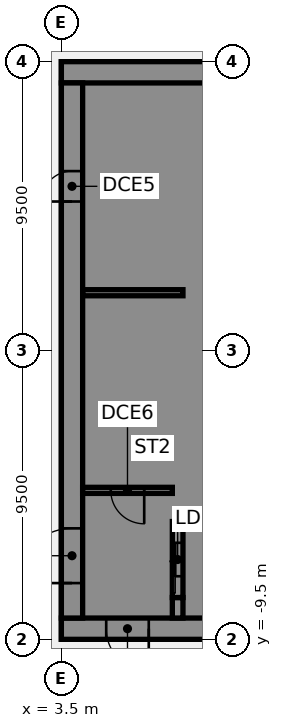
"""IFC4 building model, lengths in metres.
Left out: names, types, materials, properties, quantities, classifications, styles, units other than length and angle.
Written with IfcOpenShell. Run it as: python <this file> out.ifc"""

import sys

from ifc_helpers import new_model, si_unit, direction, frame, frame_2d, origin, place, context, subcontext, project, spatial, polyline, rectangle, outline, extrude, element, fill, save


model = new_model("IFC4")
c1 = context("Model", 3, precision=1e-05, world=origin(), true_north=direction((0.0, 1.0)))
c2 = subcontext(c1, "Body", "Model", "MODEL_VIEW")
j1 = project(units=[si_unit("LENGTHUNIT", "METRE"), si_unit("PLANEANGLEUNIT", "RADIAN")], contexts=[c1])
p1 = place(None, origin())
s1 = spatial("IfcSite", under=j1, at=p1, CompositionType="ELEMENT")
p2 = place(p1, origin())
s2 = spatial("IfcBuilding", under=s1, at=p2, CompositionType="ELEMENT")
p3 = place(p2, frame((0.0, 0.0, 37.75)))
s3 = spatial("IfcBuildingStorey", under=s2, at=p3, CompositionType="ELEMENT", Elevation=37.75)
p4 = place(p3, frame((16.5, -9.15, 0.0), z_axis=(0.0, 0.0, 1.0), x_axis=(-1.0, 0.0, 0.0)))
e1 = element("IfcWall", 1, at=p4, inside=s3, PredefinedType="SHEAR", context=c2, shape_type="SweptSolid", body=[
    extrude(rectangle(XDim=13.0, YDim=0.7, at=frame_2d((6.5, 0.0))), origin(), (0.0, 0.0, 1.0), 3.61),
])
p5 = place(p4, frame((4.15, 0.0, 0.0)))
e2 = element("IfcOpeningElement", 2, at=p5, cuts=e1, PredefinedType="OPENING", context=c2, shape_type="SweptSolid", body=[
    extrude(rectangle(XDim=1.4, YDim=2.1, at=frame_2d((0.7, 1.05))), frame((0.0, 0.36, 0.0), z_axis=(0.0, -1.0, 0.0), x_axis=(1.0, 0.0, 0.0)), (0.0, 0.0, 1.0), 0.72),
])
p6 = place(p4, frame((10.125, 0.0, 0.0)))
e3 = element("IfcOpeningElement", 3, at=p6, cuts=e1, PredefinedType="OPENING", context=c2, shape_type="SweptSolid", body=[
    extrude(rectangle(XDim=1.4, YDim=2.1, at=frame_2d((0.7, 1.05))), frame((0.0, 0.36, 0.0), z_axis=(0.0, -1.0, 0.0), x_axis=(1.0, 0.0, 0.0)), (0.0, 0.0, 1.0), 0.72),
])
p7 = place(p3, frame((16.5, 9.15, 0.0), z_axis=(0.0, 0.0, 1.0), x_axis=(-1.0, 0.0, 0.0)))
e4 = element("IfcWall", 4, at=p7, inside=s3, PredefinedType="SHEAR", context=c2, shape_type="SweptSolid", body=[
    extrude(rectangle(XDim=13.0, YDim=0.7, at=frame_2d((6.5, 0.0))), origin(), (0.0, 0.0, 1.0), 3.61),
])
p8 = place(p3, origin())
e5 = element("IfcWall", 5, at=p8, inside=s3, PredefinedType="SHEAR", context=c2, shape_type="SweptSolid", body=[
    extrude(outline(polyline([(9.8, -5.375), (7.5, -5.375), (7.5, -2.875), (9.8, -2.875), (9.8, -2.625), (7.5, -2.625), (7.5, -0.125), (9.8, -0.125), (9.8, 0.125), (7.5, 0.125), (7.5, 2.625), (9.8, 2.625), (9.8, 2.875), (7.5, 2.875), (7.5, 5.375), (9.8, 5.375), (9.8, 5.625), (7.5, 5.625), (7.5, 8.125), (9.8, 8.125), (9.8, 8.8), (7.5, 8.8), (7.15, 8.8), (7.15, -5.625), (7.5, -5.625), (9.8, -5.625), (9.8, -5.375)])), origin(), (0.0, 0.0, 1.0), 3.61),
])
p9 = place(p3, origin())
e6 = element("IfcWall", 6, at=p9, inside=s3, PredefinedType="SHEAR", context=c2, shape_type="SweptSolid", body=[
    extrude(outline(polyline([(7.5, -8.125), (7.5, -8.8), (9.8, -8.8), (9.8, -8.125), (9.8, -5.625), (9.55, -5.625), (9.55, -8.125), (7.5, -8.125)])), origin(), (0.0, 0.0, 1.0), 3.61),
])
p10 = place(p3, frame((7.325, -8.8, 0.0), z_axis=(0.0, 0.0, 1.0), x_axis=(0.0, 1.0, 0.0)))
e7 = element("IfcWall", 7, at=p10, inside=s3, PredefinedType="SHEAR", context=c2, shape_type="SweptSolid", body=[
    extrude(rectangle(XDim=0.675, YDim=0.35, at=frame_2d((0.337, 0.0))), origin(), (0.0, 0.0, 1.0), 3.61),
])
p11 = place(p3, frame((7.5, 1.9, 0.0), z_axis=(0.0, 0.0, 1.0), x_axis=(-1.0, 0.0, 0.0)))
e8 = element("IfcWall", 8, at=p11, inside=s3, PredefinedType="SHEAR", context=c2, shape_type="SweptSolid", body=[
    extrude(rectangle(XDim=3.3, YDim=0.2, at=frame_2d((1.65, 0.0))), origin(), (0.0, 0.0, 1.0), 3.61),
])
p12 = place(p3, frame((7.325, -8.125, 0.0), z_axis=(0.0, 0.0, 1.0), x_axis=(0.0, 1.0, 0.0)))
e9 = element("IfcWall", 9, at=p12, inside=s3, PredefinedType="SHEAR", context=c2, shape_type="SweptSolid", body=[
    extrude(rectangle(XDim=2.5, YDim=0.35, at=frame_2d((1.25, 0.0))), origin(), (0.0, 0.0, 1.0), 3.61),
])
p13 = place(p12, frame((0.7, 0.0, 0.0)))
e10 = element("IfcOpeningElement", 10, at=p13, cuts=e9, PredefinedType="OPENING", context=c2, shape_type="SweptSolid", body=[
    extrude(rectangle(XDim=1.1, YDim=2.1, at=frame_2d((0.55, 1.05))), frame((0.0, 0.185, 0.0), z_axis=(0.0, -1.0, 0.0), x_axis=(1.0, 0.0, 0.0)), (0.0, 0.0, 1.0), 0.37),
])
p14 = place(p3, frame((3.85, -8.8, 0.0), z_axis=(0.0, 0.0, 1.0), x_axis=(0.0, 1.0, 0.0)))
e11 = element("IfcWall", 11, at=p14, inside=s3, PredefinedType="SHEAR", context=c2, shape_type="SweptSolid", body=[
    extrude(rectangle(XDim=17.6, YDim=0.7, at=frame_2d((8.8, 0.0))), origin(), (0.0, 0.0, 1.0), 3.61),
])
p15 = place(p14, frame((1.15, 0.0, 0.0)))
e12 = element("IfcOpeningElement", 12, at=p15, cuts=e11, PredefinedType="OPENING", context=c2, shape_type="SweptSolid", body=[
    extrude(rectangle(XDim=1.8, YDim=2.1, at=frame_2d((0.9, 1.05))), frame((0.0, 0.36, 0.0), z_axis=(0.0, -1.0, 0.0), x_axis=(1.0, 0.0, 0.0)), (0.0, 0.0, 1.0), 0.72),
])
p16 = place(p14, frame((13.7, 0.0, 0.0)))
e13 = element("IfcOpeningElement", 13, at=p16, cuts=e11, PredefinedType="OPENING", context=c2, shape_type="SweptSolid", body=[
    extrude(rectangle(XDim=1.0, YDim=2.1, at=frame_2d((0.5, 1.05))), frame((0.0, 0.36, 0.0), z_axis=(0.0, -1.0, 0.0), x_axis=(1.0, 0.0, 0.0)), (0.0, 0.0, 1.0), 0.72),
])
p17 = place(p3, frame((7.15, -4.6, 0.0), z_axis=(0.0, 0.0, 1.0), x_axis=(-1.0, 0.0, 0.0)))
e14 = element("IfcWall", 14, at=p17, inside=s3, PredefinedType="SHEAR", context=c2, shape_type="SweptSolid", body=[
    extrude(rectangle(XDim=2.95, YDim=0.2, at=frame_2d((1.475, 0.0))), origin(), (0.0, 0.0, 1.0), 3.61),
])
p18 = place(p17, frame((0.925, 0.0, 0.0)))
e15 = element("IfcOpeningElement", 15, at=p18, cuts=e14, PredefinedType="OPENING", context=c2, shape_type="SweptSolid", body=[
    extrude(rectangle(XDim=1.1, YDim=2.1, at=frame_2d((0.55, 1.05))), frame((0.0, 0.11, 0.0), z_axis=(0.0, -1.0, 0.0), x_axis=(1.0, 0.0, 0.0)), (0.0, 0.0, 1.0), 0.22),
])
p19 = place(p6, origin())
e16 = element("IfcDoor", 16, at=p19, inside=s3, OperationType="SINGLE_SWING_LEFT", PredefinedType="DOOR", context=c2, shape_type="SweptSolid", body=[
    extrude(rectangle(XDim=1.4, YDim=2.1, at=frame_2d((0.7, 1.05))), frame((0.0, 0.025, 0.0), z_axis=(0.0, -1.0, 0.0), x_axis=(1.0, 0.0, 0.0)), (0.0, 0.0, 1.0), 0.05),
])
fill(e3, e16)
p20 = place(p15, origin())
e17 = element("IfcDoor", 17, at=p20, inside=s3, OperationType="SINGLE_SWING_LEFT", PredefinedType="DOOR", context=c2, shape_type="SweptSolid", body=[
    extrude(rectangle(XDim=1.8, YDim=2.1, at=frame_2d((0.9, 1.05))), frame((0.0, 0.025, 0.0), z_axis=(0.0, -1.0, 0.0), x_axis=(1.0, 0.0, 0.0)), (0.0, 0.0, 1.0), 0.05),
])
fill(e12, e17)
p21 = place(p16, origin())
e18 = element("IfcDoor", 18, at=p21, inside=s3, OperationType="SINGLE_SWING_LEFT", PredefinedType="DOOR", context=c2, shape_type="SweptSolid", body=[
    extrude(rectangle(XDim=1.0, YDim=2.1, at=frame_2d((0.5, 1.05))), frame((0.0, 0.025, 0.0), z_axis=(0.0, -1.0, 0.0), x_axis=(1.0, 0.0, 0.0)), (0.0, 0.0, 1.0), 0.05),
])
fill(e13, e18)
p22 = place(p18, origin())
e19 = element("IfcDoor", 19, at=p22, inside=s3, OperationType="SINGLE_SWING_LEFT", PredefinedType="DOOR", context=c2, shape_type="SweptSolid", body=[
    extrude(rectangle(XDim=1.1, YDim=2.1, at=frame_2d((0.55, 1.05))), frame((0.0, 0.025, 0.0), z_axis=(0.0, -1.0, 0.0), x_axis=(1.0, 0.0, 0.0)), (0.0, 0.0, 1.0), 0.05),
])
fill(e15, e19)
p23 = place(p13, origin())
e20 = element("IfcDoor", 20, at=p23, inside=s3, OperationType="SLIDING_TO_LEFT", PredefinedType="DOOR", context=c2, shape_type="SweptSolid", body=[
    extrude(rectangle(XDim=1.1, YDim=2.1, at=frame_2d((0.55, 1.05))), frame((0.0, 0.025, 0.0), z_axis=(0.0, -1.0, 0.0), x_axis=(1.0, 0.0, 0.0)), (0.0, 0.0, 1.0), 0.05),
])
fill(e10, e20)
save(model, sys.argv[1])
